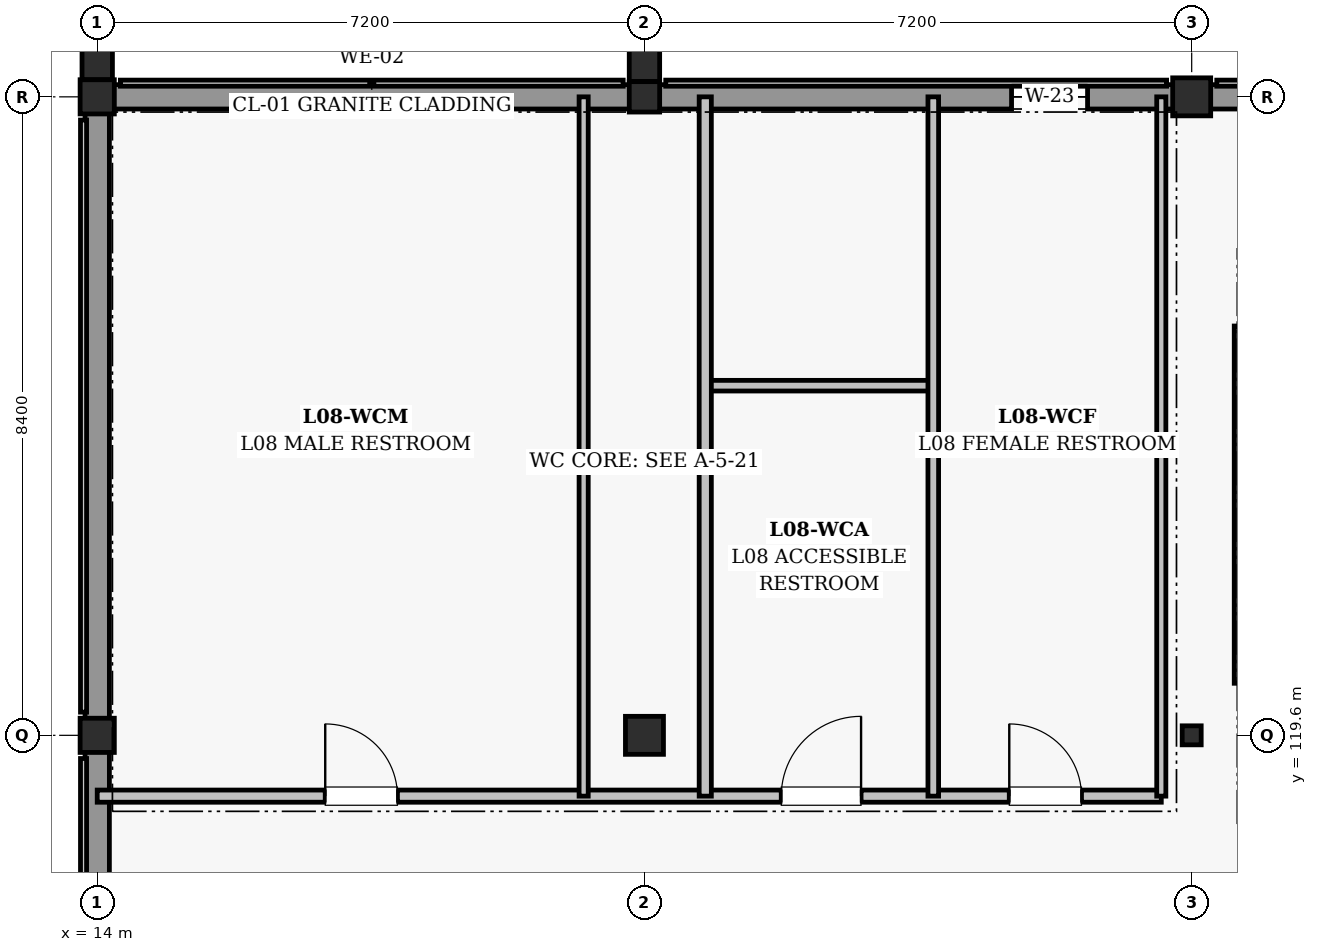
"""IFC4 building model, lengths in metres.
Left out: names, types, materials, properties, quantities, classifications, styles, units other than length and angle.
Written with IfcOpenShell. Run it as: python <this file> out.ifc"""

import sys

from ifc_helpers import new_model, si_unit, direction, frame, frame_2d, origin, origin_2d, place, context, subcontext, project, spatial, rectangle, i_section, extrude, element, fill, save


model = new_model("IFC4")
c1 = context("Model", 3, precision=1e-05, world=origin(), true_north=direction((0.0, 1.0)))
c2 = subcontext(c1, "Body", "Model", "MODEL_VIEW")
j1 = project(units=[si_unit("LENGTHUNIT", "METRE"), si_unit("PLANEANGLEUNIT", "RADIAN")], contexts=[c1])
p1 = place(None, origin())
s1 = spatial("IfcSite", under=j1, at=p1, CompositionType="ELEMENT")
p2 = place(p1, origin())
s2 = spatial("IfcBuilding", under=s1, at=p2, CompositionType="ELEMENT")
p3 = place(p2, frame((0.0, 0.0, 36.9)))
s3 = spatial("IfcBuildingStorey", under=s2, at=p3, CompositionType="ELEMENT", Elevation=36.9)
for number, where, z_axis, x_axis in (
    (1, (14.0, 119.6, 0.0), (0.0, 0.0, 1.0), (1.0, 0.0, 0.0)),
    (2, (14.0, 128.0, 0.0), (0.0, 0.0, 1.0), (1.0, 0.0, 0.0)),
):
    element("IfcColumn", number, at=place(p3, frame(where, z_axis=z_axis, x_axis=x_axis)), inside=s3, PredefinedType="COLUMN", context=c2, shape_type="SweptSolid", body=[
        extrude(rectangle(XDim=0.45, YDim=0.45, at=origin_2d()), origin(), (0.0, 0.0, 1.0), 4.5),
    ])
p4 = place(p3, frame((21.2, 119.6, 0.0), z_axis=(0.0, 0.0, 1.0), x_axis=(1.0, 0.0, 0.0)))
e3 = element("IfcColumn", 3, at=p4, inside=s3, PredefinedType="COLUMN", context=c2, shape_type="SweptSolid", body=[
    extrude(rectangle(XDim=0.5, YDim=0.5, at=origin_2d()), origin(), (0.0, 0.0, 1.0), 4.5),
])
p5 = place(p3, frame((21.2, 128.0, 0.0), z_axis=(0.0, 0.0, 1.0), x_axis=(1.0, 0.0, 0.0)))
e4 = element("IfcColumn", 4, at=p5, inside=s3, PredefinedType="COLUMN", context=c2, shape_type="SweptSolid", body=[
    extrude(rectangle(XDim=0.4, YDim=0.4, at=origin_2d()), origin(), (0.0, 0.0, 1.0), 4.5),
])
p6 = place(p3, frame((28.4, 119.6, 0.0), z_axis=(0.0, 0.0, 1.0), x_axis=(1.0, 0.0, 0.0)))
e5 = element("IfcColumn", 5, at=p6, inside=s3, PredefinedType="COLUMN", context=c2, shape_type="SweptSolid", body=[
    extrude(i_section(OverallWidth=0.25, OverallDepth=0.25, WebThickness=0.009, FlangeThickness=0.01, FilletRadius=0.01, at=origin_2d()), origin(), (0.0, 0.0, 1.0), 4.5),
])
p7 = place(p3, frame((28.4, 128.0, 0.0), z_axis=(0.0, 0.0, 1.0), x_axis=(1.0, 0.0, 0.0)))
e6 = element("IfcColumn", 6, at=p7, inside=s3, PredefinedType="COLUMN", context=c2, shape_type="SweptSolid", body=[
    extrude(rectangle(XDim=0.5, YDim=0.5, at=origin_2d()), origin(), (0.0, 0.0, 1.0), 4.5),
])
for number, where, z_axis, x_axis in (
    (7, (14.0, 128.528, 0.0), (0.0, 0.0, 1.0), (1.0, 0.0, 0.0)),
    (8, (21.2, 128.503, 0.0), (0.0, 0.0, 1.0), (1.0, 0.0, 0.0)),
):
    element("IfcColumn", number, at=place(p3, frame(where, z_axis=z_axis, x_axis=x_axis)), inside=s3, PredefinedType="PILASTER", context=c2, shape_type="SweptSolid", body=[
        extrude(rectangle(XDim=0.4, YDim=0.6, at=origin_2d()), origin(), (0.0, 0.0, 1.0), 4.5),
    ])
p8 = place(p3, frame((14.205, 128.0, 0.0), z_axis=(0.0, 0.0, 1.0), x_axis=(1.0, 0.0, 0.0)))
e9 = element("IfcWall", 9, at=p8, inside=s3, PredefinedType="SOLIDWALL", context=c2, shape_type="SweptSolid", body=[
    extrude(rectangle(XDim=6.815, YDim=0.32, at=frame_2d((3.407, 0.0))), origin(), (0.0, 0.0, 1.0), 3.305),
])
p9 = place(p3, frame((21.38, 128.0, 0.0), z_axis=(0.0, 0.0, 1.0), x_axis=(1.0, 0.0, 0.0)))
e10 = element("IfcWall", 10, at=p9, inside=s3, PredefinedType="SOLIDWALL", context=c2, shape_type="SweptSolid", body=[
    extrude(rectangle(XDim=6.79, YDim=0.32, at=frame_2d((3.395, 0.0))), origin(), (0.0, 0.0, 1.0), 3.305),
])
p10 = place(p9, frame((4.65, 0.0, 1.85)))
e11 = element("IfcOpeningElement", 11, at=p10, cuts=e10, PredefinedType="OPENING", context=c2, shape_type="SweptSolid", body=[
    extrude(rectangle(XDim=1.0, YDim=0.95, at=frame_2d((0.5, 0.475))), frame((0.0, 0.17, 0.0), z_axis=(0.0, -1.0, 0.0), x_axis=(1.0, 0.0, 0.0)), (0.0, 0.0, 1.0), 0.34),
])
p11 = place(p3, frame((28.63, 128.0, 0.0), z_axis=(0.0, 0.0, 1.0), x_axis=(1.0, 0.0, 0.0)))
e12 = element("IfcWall", 12, at=p11, inside=s3, PredefinedType="SOLIDWALL", context=c2, shape_type="SweptSolid", body=[
    extrude(rectangle(XDim=6.765, YDim=0.32, at=frame_2d((3.383, 0.0))), origin(), (0.0, 0.0, 1.0), 3.355),
])
p12 = place(p3, frame((14.0, 111.38, 0.0), z_axis=(0.0, 0.0, 1.0), x_axis=(0.0, 1.0, 0.0)))
e13 = element("IfcWall", 13, at=p12, inside=s3, PredefinedType="SOLIDWALL", context=c2, shape_type="SweptSolid", body=[
    extrude(rectangle(XDim=8.015, YDim=0.32, at=frame_2d((4.008, 0.0))), origin(), (0.0, 0.0, 1.0), 3.405),
])
p13 = place(p3, frame((14.0, 119.805, 0.0), z_axis=(0.0, 0.0, 1.0), x_axis=(0.0, 1.0, 0.0)))
e14 = element("IfcWall", 14, at=p13, inside=s3, PredefinedType="SOLIDWALL", context=c2, shape_type="SweptSolid", body=[
    extrude(rectangle(XDim=7.99, YDim=0.32, at=frame_2d((3.995, 0.0))), origin(), (0.0, 0.0, 1.0), 3.405),
])
p14 = place(p3, frame((29.085, 124.985, 0.0), z_axis=(0.0, 0.0, 1.0), x_axis=(0.0, -1.0, 0.0)))
e15 = element("IfcWall", 15, at=p14, inside=s3, PredefinedType="SHEAR", context=c2, shape_type="SweptSolid", body=[
    extrude(rectangle(XDim=4.7, YDim=0.25, at=frame_2d((2.35, 0.0))), origin(), (0.0, 0.0, 1.0), 4.215),
])
p15 = place(p3, frame((14.0, 118.8, 0.0), z_axis=(0.0, 0.0, 1.0), x_axis=(1.0, 0.0, 0.0)))
e16 = element("IfcWall", 16, at=p15, inside=s3, PredefinedType="PARTITIONING", context=c2, shape_type="SweptSolid", body=[
    extrude(rectangle(XDim=14.0, YDim=0.16, at=frame_2d((7.0, 0.0))), origin(), (0.0, 0.0, 1.0), 3.36),
])
p16 = place(p15, frame((3.0, 0.0, 0.0)))
e17 = element("IfcOpeningElement", 17, at=p16, cuts=e16, PredefinedType="OPENING", context=c2, shape_type="SweptSolid", body=[
    extrude(rectangle(XDim=0.95, YDim=2.15, at=frame_2d((0.475, 1.075))), frame((0.0, 0.09, 0.0), z_axis=(0.0, -1.0, 0.0), x_axis=(1.0, 0.0, 0.0)), (0.0, 0.0, 1.0), 0.18),
])
p17 = place(p15, frame((9.0, 0.0, 0.0)))
e18 = element("IfcOpeningElement", 18, at=p17, cuts=e16, PredefinedType="OPENING", context=c2, shape_type="SweptSolid", body=[
    extrude(rectangle(XDim=1.05, YDim=2.15, at=frame_2d((0.525, 1.075))), frame((0.0, 0.09, 0.0), z_axis=(0.0, -1.0, 0.0), x_axis=(1.0, 0.0, 0.0)), (0.0, 0.0, 1.0), 0.18),
])
p18 = place(p15, frame((12.0, 0.0, 0.0)))
e19 = element("IfcOpeningElement", 19, at=p18, cuts=e16, PredefinedType="OPENING", context=c2, shape_type="SweptSolid", body=[
    extrude(rectangle(XDim=0.95, YDim=2.15, at=frame_2d((0.475, 1.075))), frame((0.0, 0.09, 0.0), z_axis=(0.0, -1.0, 0.0), x_axis=(1.0, 0.0, 0.0)), (0.0, 0.0, 1.0), 0.18),
])
p19 = place(p3, frame((22.0, 124.2, 0.0), z_axis=(0.0, 0.0, 1.0), x_axis=(1.0, 0.0, 0.0)))
e20 = element("IfcWall", 20, at=p19, inside=s3, PredefinedType="PARTITIONING", context=c2, shape_type="SweptSolid", body=[
    extrude(rectangle(XDim=3.0, YDim=0.14, at=frame_2d((1.5, 0.0))), origin(), (0.0, 0.0, 1.0), 4.12),
])
p20 = place(p3, frame((20.4, 118.8, 0.0), z_axis=(0.0, 0.0, 1.0), x_axis=(0.0, 1.0, 0.0)))
e21 = element("IfcWall", 21, at=p20, inside=s3, PredefinedType="PARTITIONING", context=c2, shape_type="SweptSolid", body=[
    extrude(rectangle(XDim=9.2, YDim=0.12, at=frame_2d((4.6, 0.0))), origin(), (0.0, 0.0, 1.0), 3.41),
])
p21 = place(p3, frame((22.0, 118.8, 0.0), z_axis=(0.0, 0.0, 1.0), x_axis=(0.0, 1.0, 0.0)))
e22 = element("IfcWall", 22, at=p21, inside=s3, PredefinedType="PARTITIONING", context=c2, shape_type="SweptSolid", body=[
    extrude(rectangle(XDim=9.2, YDim=0.16, at=frame_2d((4.6, 0.0))), origin(), (0.0, 0.0, 1.0), 3.36),
])
p22 = place(p3, frame((25.0, 118.8, 0.0), z_axis=(0.0, 0.0, 1.0), x_axis=(0.0, 1.0, 0.0)))
e23 = element("IfcWall", 23, at=p22, inside=s3, PredefinedType="PARTITIONING", context=c2, shape_type="SweptSolid", body=[
    extrude(rectangle(XDim=9.2, YDim=0.14, at=frame_2d((4.6, 0.0))), origin(), (0.0, 0.0, 1.0), 3.36),
])
p23 = place(p3, frame((28.0, 118.8, 0.0), z_axis=(0.0, 0.0, 1.0), x_axis=(0.0, 1.0, 0.0)))
e24 = element("IfcWall", 24, at=p23, inside=s3, PredefinedType="PARTITIONING", context=c2, shape_type="SweptSolid", body=[
    extrude(rectangle(XDim=9.2, YDim=0.12, at=frame_2d((4.6, 0.0))), origin(), (0.0, 0.0, 1.0), 3.36),
])
p24 = place(p10, origin())
e25 = element("IfcWindow", 25, at=p24, inside=s3, PartitioningType="SINGLE_PANEL", PredefinedType="WINDOW", context=c2, shape_type="SweptSolid", body=[
    extrude(rectangle(XDim=1.0, YDim=0.95, at=frame_2d((0.5, 0.475))), frame((0.0, 0.03, 0.0), z_axis=(0.0, -1.0, 0.0), x_axis=(1.0, 0.0, 0.0)), (0.0, 0.0, 1.0), 0.06),
])
fill(e11, e25)
p25 = place(p16, origin())
e26 = element("IfcDoor", 26, at=p25, inside=s3, OperationType="SINGLE_SWING_LEFT", PredefinedType="DOOR", context=c2, shape_type="SweptSolid", body=[
    extrude(rectangle(XDim=0.95, YDim=2.15, at=frame_2d((0.475, 1.075))), frame((0.0, 0.025, 0.0), z_axis=(0.0, -1.0, 0.0), x_axis=(1.0, 0.0, 0.0)), (0.0, 0.0, 1.0), 0.05),
])
fill(e17, e26)
p26 = place(p17, origin())
e27 = element("IfcDoor", 27, at=p26, inside=s3, OperationType="SINGLE_SWING_RIGHT", PredefinedType="DOOR", context=c2, shape_type="SweptSolid", body=[
    extrude(rectangle(XDim=1.05, YDim=2.15, at=frame_2d((0.525, 1.075))), frame((0.0, 0.025, 0.0), z_axis=(0.0, -1.0, 0.0), x_axis=(1.0, 0.0, 0.0)), (0.0, 0.0, 1.0), 0.05),
])
fill(e18, e27)
p27 = place(p18, origin())
e28 = element("IfcDoor", 28, at=p27, inside=s3, OperationType="SINGLE_SWING_LEFT", PredefinedType="DOOR", context=c2, shape_type="SweptSolid", body=[
    extrude(rectangle(XDim=0.95, YDim=2.15, at=frame_2d((0.475, 1.075))), frame((0.0, 0.025, 0.0), z_axis=(0.0, -1.0, 0.0), x_axis=(1.0, 0.0, 0.0)), (0.0, 0.0, 1.0), 0.05),
])
fill(e19, e28)
save(model, sys.argv[1])
